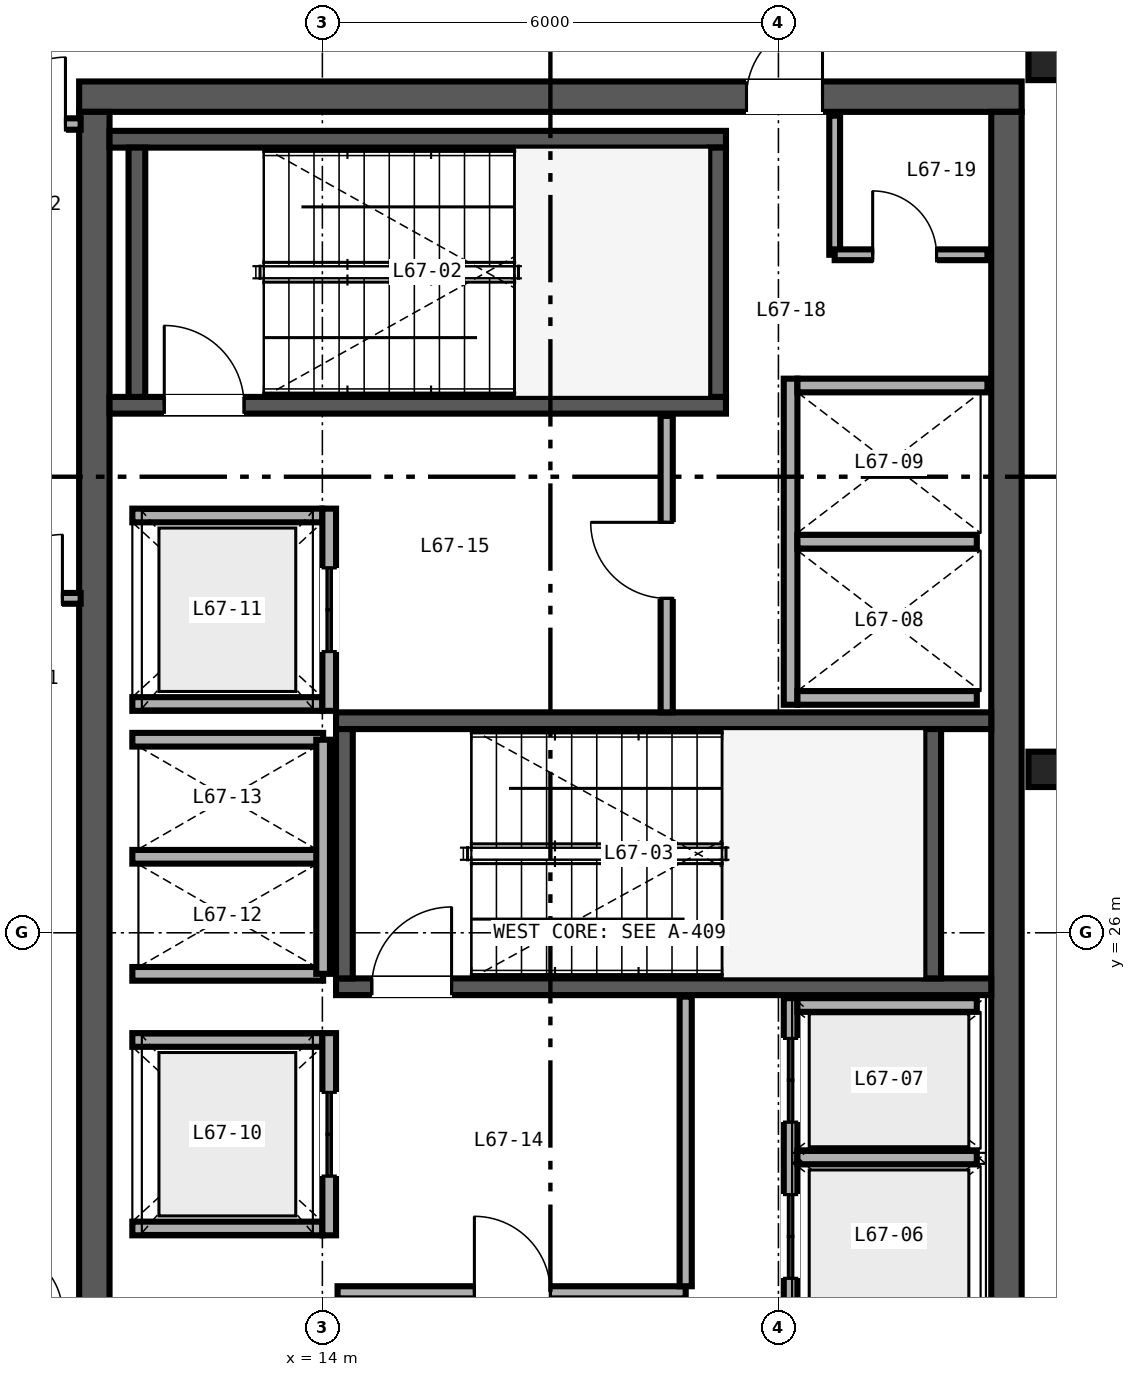
"""IFC4 building model, lengths in metres.
Left out: names, types, materials, properties, quantities, classifications, styles, units other than length and angle.
Written with IfcOpenShell. Run it as: python <this file> out.ifc"""

import sys

from ifc_helpers import new_model, si_unit, direction, frame, frame_2d, origin, origin_2d, place, context, subcontext, project, spatial, rectangle, i_section, extrude, source, transform, mapped, element, fill, save


model = new_model("IFC4")
c1 = context("Model", 3, precision=1e-05, world=origin(), true_north=direction((0.0, 1.0)))
c2 = subcontext(c1, "Body", "Model", "MODEL_VIEW")
j1 = project(units=[si_unit("LENGTHUNIT", "METRE"), si_unit("PLANEANGLEUNIT", "RADIAN")], contexts=[c1])
p1 = place(None, origin())
s1 = spatial("IfcSite", under=j1, at=p1, CompositionType="ELEMENT")
p2 = place(p1, origin())
s2 = spatial("IfcBuilding", under=s1, at=p2, CompositionType="ELEMENT")
p3 = place(p2, frame((0.0, 0.0, 265.2)))
s3 = spatial("IfcBuildingStorey", under=s2, at=p3, CompositionType="ELEMENT", Elevation=265.2)
p4 = place(p3, frame((10.8, 37.0, 0.0), z_axis=(0.0, 0.0, 1.0), x_axis=(1.0, 0.0, 0.0)))
e1 = element("IfcWall", 1, at=p4, inside=s3, PredefinedType="SHEAR", context=c2, shape_type="SweptSolid", body=[
    extrude(rectangle(XDim=12.4, YDim=0.4, at=frame_2d((6.2, 0.0))), origin(), (0.0, 0.0, 1.0), 3.38),
])
p5 = place(p4, frame((8.78, 0.0, 0.0)))
e2 = element("IfcOpeningElement", 2, at=p5, cuts=e1, PredefinedType="OPENING", context=c2, shape_type="SweptSolid", body=[
    extrude(rectangle(XDim=1.0, YDim=2.15, at=frame_2d((0.5, 1.075))), frame((0.0, 0.21, 0.0), z_axis=(0.0, -1.0, 0.0), x_axis=(1.0, 0.0, 0.0)), (0.0, 0.0, 1.0), 0.42),
])
for number, where, z_axis, x_axis in (
    (3, (11.0, 15.2, 0.0), (0.0, 0.0, 1.0), (0.0, 1.0, 0.0)),
    (4, (23.0, 15.2, 0.0), (0.0, 0.0, 1.0), (0.0, 1.0, 0.0)),
):
    element("IfcWall", number, at=place(p3, frame(where, z_axis=z_axis, x_axis=x_axis)), inside=s3, PredefinedType="SHEAR", context=c2, shape_type="SweptSolid", body=[
        extrude(rectangle(XDim=21.6, YDim=0.4, at=frame_2d((10.8, 0.0))), origin(), (0.0, 0.0, 1.0), 3.38),
    ])
p6 = place(p3, frame((11.2, 32.94, 0.0), z_axis=(0.0, 0.0, 1.0), x_axis=(1.0, 0.0, 0.0)))
e5 = element("IfcWall", 5, at=p6, inside=s3, PredefinedType="SHEAR", context=c2, shape_type="SweptSolid", body=[
    extrude(rectangle(XDim=8.11, YDim=0.22, at=frame_2d((4.055, 0.0))), origin(), (0.0, 0.0, 1.0), 3.4),
])
p7 = place(p6, frame((0.72, 0.0, 0.0)))
e6 = element("IfcOpeningElement", 6, at=p7, cuts=e5, PredefinedType="OPENING", context=c2, shape_type="SweptSolid", body=[
    extrude(rectangle(XDim=1.05, YDim=2.15, at=frame_2d((0.525, 1.075))), frame((0.0, 0.12, 0.0), z_axis=(0.0, -1.0, 0.0), x_axis=(1.0, 0.0, 0.0)), (0.0, 0.0, 1.0), 0.24),
])
p8 = place(p3, frame((11.2, 36.44, 0.0), z_axis=(0.0, 0.0, 1.0), x_axis=(1.0, 0.0, 0.0)))
e7 = element("IfcWall", 7, at=p8, inside=s3, PredefinedType="SHEAR", context=c2, shape_type="SweptSolid", body=[
    extrude(rectangle(XDim=8.11, YDim=0.22, at=frame_2d((4.055, 0.0))), origin(), (0.0, 0.0, 1.0), 3.4),
])
for number, where, z_axis, x_axis in (
    (8, (11.56, 33.05, 0.0), (0.0, 0.0, 1.0), (0.0, 1.0, 0.0)),
    (9, (19.2, 33.05, 0.0), (0.0, 0.0, 1.0), (0.0, 1.0, 0.0)),
):
    element("IfcWall", number, at=place(p3, frame(where, z_axis=z_axis, x_axis=x_axis)), inside=s3, PredefinedType="SHEAR", context=c2, shape_type="SweptSolid", body=[
        extrude(rectangle(XDim=3.28, YDim=0.22, at=frame_2d((1.64, 0.0))), origin(), (0.0, 0.0, 1.0), 3.4),
    ])
p9 = place(p3, frame((14.18, 25.29, 0.0), z_axis=(0.0, 0.0, 1.0), x_axis=(1.0, 0.0, 0.0)))
e10 = element("IfcWall", 10, at=p9, inside=s3, PredefinedType="SHEAR", context=c2, shape_type="SweptSolid", body=[
    extrude(rectangle(XDim=8.62, YDim=0.22, at=frame_2d((4.31, 0.0))), origin(), (0.0, 0.0, 1.0), 3.4),
])
p10 = place(p9, frame((0.47, 0.0, 0.0)))
e11 = element("IfcOpeningElement", 11, at=p10, cuts=e10, PredefinedType="OPENING", context=c2, shape_type="SweptSolid", body=[
    extrude(rectangle(XDim=1.05, YDim=2.15, at=frame_2d((0.525, 1.075))), frame((0.0, 0.12, 0.0), z_axis=(0.0, -1.0, 0.0), x_axis=(1.0, 0.0, 0.0)), (0.0, 0.0, 1.0), 0.24),
])
p11 = place(p3, frame((14.18, 28.79, 0.0), z_axis=(0.0, 0.0, 1.0), x_axis=(1.0, 0.0, 0.0)))
e12 = element("IfcWall", 12, at=p11, inside=s3, PredefinedType="SHEAR", context=c2, shape_type="SweptSolid", body=[
    extrude(rectangle(XDim=8.62, YDim=0.22, at=frame_2d((4.31, 0.0))), origin(), (0.0, 0.0, 1.0), 3.4),
])
for number, where, z_axis, x_axis in (
    (13, (14.29, 25.4, 0.0), (0.0, 0.0, 1.0), (0.0, 1.0, 0.0)),
    (14, (22.03, 25.4, 0.0), (0.0, 0.0, 1.0), (0.0, 1.0, 0.0)),
):
    element("IfcWall", number, at=place(p3, frame(where, z_axis=z_axis, x_axis=x_axis)), inside=s3, PredefinedType="SHEAR", context=c2, shape_type="SweptSolid", body=[
        extrude(rectangle(XDim=3.28, YDim=0.22, at=frame_2d((1.64, 0.0))), origin(), (0.0, 0.0, 1.0), 3.4),
    ])
m1 = source(origin(), c2, "Body", "SweptSolid", [
    extrude(i_section(OverallWidth=0.422, OverallDepth=0.465, WebThickness=0.045, FlangeThickness=0.073, FilletRadius=0.025, at=origin_2d()), origin(), (0.0, 0.0, 1.0), 3.38),
])
for number, where, z_axis, x_axis in (
    (15, (23.5, 28.15, 0.0), (0.0, 0.0, 1.0), (1.0, 0.0, 0.0)),
    (16, (23.5, 37.45, 0.0), (0.0, 0.0, 1.0), (1.0, 0.0, 0.0)),
):
    element("IfcColumn", number, at=place(p3, frame(where, z_axis=z_axis, x_axis=x_axis)), inside=s3, PredefinedType="COLUMN", context=c2, shape_type="MappedRepresentation", body=[
        mapped(m1, transform((0.0, 0.0, 0.0), scale=1.0)),
    ])
p12 = place(p3, frame((20.16, 18.82, 0.0), z_axis=(0.0, 0.0, 1.0), x_axis=(0.0, 1.0, 0.0)))
e17 = element("IfcWall", 17, at=p12, inside=s3, PredefinedType="SOLIDWALL", context=c2, shape_type="SweptSolid", body=[
    extrude(rectangle(XDim=6.32, YDim=0.18, at=frame_2d((3.16, 0.0))), origin(), (0.0, 0.0, 1.0), 2.48),
])
p13 = place(p12, frame((0.555, 0.0, 0.0)))
e18 = element("IfcOpeningElement", 18, at=p13, cuts=e17, PredefinedType="OPENING", context=c2, shape_type="SweptSolid", body=[
    extrude(rectangle(XDim=1.1, YDim=2.2, at=frame_2d((0.55, 1.1))), frame((0.0, 0.1, 0.0), z_axis=(0.0, -1.0, 0.0), x_axis=(1.0, 0.0, 0.0)), (0.0, 0.0, 1.0), 0.2),
])
p14 = place(p12, frame((2.635, 0.0, 0.0)))
e19 = element("IfcOpeningElement", 19, at=p14, cuts=e17, PredefinedType="OPENING", context=c2, shape_type="SweptSolid", body=[
    extrude(rectangle(XDim=1.1, YDim=2.2, at=frame_2d((0.55, 1.1))), frame((0.0, 0.1, 0.0), z_axis=(0.0, -1.0, 0.0), x_axis=(1.0, 0.0, 0.0)), (0.0, 0.0, 1.0), 0.2),
])
p15 = place(p12, frame((4.69, 0.0, 0.0)))
e20 = element("IfcOpeningElement", 20, at=p15, cuts=e17, PredefinedType="OPENING", context=c2, shape_type="SweptSolid", body=[
    extrude(rectangle(XDim=1.1, YDim=2.2, at=frame_2d((0.55, 1.1))), frame((0.0, 0.1, 0.0), z_axis=(0.0, -1.0, 0.0), x_axis=(1.0, 0.0, 0.0)), (0.0, 0.0, 1.0), 0.2),
])
for number, where, z_axis, x_axis in (
    (21, (20.25, 25.05, 0.0), (0.0, 0.0, 1.0), (1.0, 0.0, 0.0)),
    (22, (20.25, 23.045, 0.0), (0.0, 0.0, 1.0), (1.0, 0.0, 0.0)),
):
    element("IfcWall", number, at=place(p3, frame(where, z_axis=z_axis, x_axis=x_axis)), inside=s3, PredefinedType="SOLIDWALL", context=c2, shape_type="SweptSolid", body=[
        extrude(rectangle(XDim=2.36, YDim=0.18, at=frame_2d((1.18, 0.0))), origin(), (0.0, 0.0, 1.0), 3.38),
    ])
p16 = place(p3, frame((20.16, 29.0, 0.0), z_axis=(0.0, 0.0, 1.0), x_axis=(0.0, 1.0, 0.0)))
e23 = element("IfcWall", 23, at=p16, inside=s3, PredefinedType="SOLIDWALL", context=c2, shape_type="SweptSolid", body=[
    extrude(rectangle(XDim=4.29, YDim=0.18, at=frame_2d((2.145, 0.0))), origin(), (0.0, 0.0, 1.0), 3.38),
])
p17 = place(p3, frame((20.25, 29.09, 0.0), z_axis=(0.0, 0.0, 1.0), x_axis=(1.0, 0.0, 0.0)))
e24 = element("IfcWall", 24, at=p17, inside=s3, PredefinedType="SOLIDWALL", context=c2, shape_type="SweptSolid", body=[
    extrude(rectangle(XDim=2.36, YDim=0.18, at=frame_2d((1.18, 0.0))), origin(), (0.0, 0.0, 1.0), 3.38),
])
p18 = place(p3, frame((20.25, 33.2, 0.0), z_axis=(0.0, 0.0, 1.0), x_axis=(1.0, 0.0, 0.0)))
e25 = element("IfcWall", 25, at=p18, inside=s3, PredefinedType="SOLIDWALL", context=c2, shape_type="SweptSolid", body=[
    extrude(rectangle(XDim=2.5, YDim=0.18, at=frame_2d((1.25, 0.0))), origin(), (0.0, 0.0, 1.0), 3.38),
])
p19 = place(p3, frame((20.25, 31.145, 0.0), z_axis=(0.0, 0.0, 1.0), x_axis=(1.0, 0.0, 0.0)))
e26 = element("IfcWall", 26, at=p19, inside=s3, PredefinedType="SOLIDWALL", context=c2, shape_type="SweptSolid", body=[
    extrude(rectangle(XDim=2.36, YDim=0.18, at=frame_2d((1.18, 0.0))), origin(), (0.0, 0.0, 1.0), 3.38),
])
for number, where, z_axis, x_axis in (
    (27, (11.5, 22.11, 0.0), (0.0, 0.0, 1.0), (1.0, 0.0, 0.0)),
    (28, (11.5, 24.59, 0.0), (0.0, 0.0, 1.0), (1.0, 0.0, 0.0)),
):
    element("IfcWall", number, at=place(p3, frame(where, z_axis=z_axis, x_axis=x_axis)), inside=s3, PredefinedType="SOLIDWALL", context=c2, shape_type="SweptSolid", body=[
        extrude(rectangle(XDim=2.5, YDim=0.18, at=frame_2d((1.25, 0.0))), origin(), (0.0, 0.0, 1.0), 3.38),
    ])
p20 = place(p3, frame((14.09, 22.02, 0.0), z_axis=(0.0, 0.0, 1.0), x_axis=(0.0, 1.0, 0.0)))
e29 = element("IfcWall", 29, at=p20, inside=s3, PredefinedType="SOLIDWALL", context=c2, shape_type="SweptSolid", body=[
    extrude(rectangle(XDim=2.66, YDim=0.18, at=frame_2d((1.33, 0.0))), origin(), (0.0, 0.0, 1.0), 3.38),
])
p21 = place(p20, frame((0.78, 0.0, 0.0)))
e30 = element("IfcOpeningElement", 30, at=p21, cuts=e29, PredefinedType="OPENING", context=c2, shape_type="SweptSolid", body=[
    extrude(rectangle(XDim=1.1, YDim=2.2, at=frame_2d((0.55, 1.1))), frame((0.0, 0.1, 0.0), z_axis=(0.0, -1.0, 0.0), x_axis=(1.0, 0.0, 0.0)), (0.0, 0.0, 1.0), 0.2),
])
for number, where, z_axis, x_axis in (
    (31, (11.5, 29.01, 0.0), (0.0, 0.0, 1.0), (1.0, 0.0, 0.0)),
    (32, (11.5, 31.49, 0.0), (0.0, 0.0, 1.0), (1.0, 0.0, 0.0)),
):
    element("IfcWall", number, at=place(p3, frame(where, z_axis=z_axis, x_axis=x_axis)), inside=s3, PredefinedType="SOLIDWALL", context=c2, shape_type="SweptSolid", body=[
        extrude(rectangle(XDim=2.5, YDim=0.18, at=frame_2d((1.25, 0.0))), origin(), (0.0, 0.0, 1.0), 3.38),
    ])
p22 = place(p3, frame((14.09, 28.92, 0.0), z_axis=(0.0, 0.0, 1.0), x_axis=(0.0, 1.0, 0.0)))
e33 = element("IfcWall", 33, at=p22, inside=s3, PredefinedType="SOLIDWALL", context=c2, shape_type="SweptSolid", body=[
    extrude(rectangle(XDim=2.66, YDim=0.18, at=frame_2d((1.33, 0.0))), origin(), (0.0, 0.0, 1.0), 3.38),
])
p23 = place(p22, frame((0.78, 0.0, 0.0)))
e34 = element("IfcOpeningElement", 34, at=p23, cuts=e33, PredefinedType="OPENING", context=c2, shape_type="SweptSolid", body=[
    extrude(rectangle(XDim=1.1, YDim=2.2, at=frame_2d((0.55, 1.1))), frame((0.0, 0.1, 0.0), z_axis=(0.0, -1.0, 0.0), x_axis=(1.0, 0.0, 0.0)), (0.0, 0.0, 1.0), 0.2),
])
for number, where, z_axis, x_axis in (
    (35, (11.5, 25.46, 0.0), (0.0, 0.0, 1.0), (1.0, 0.0, 0.0)),
    (36, (11.5, 27.0, 0.0), (0.0, 0.0, 1.0), (1.0, 0.0, 0.0)),
    (37, (11.5, 28.54, 0.0), (0.0, 0.0, 1.0), (1.0, 0.0, 0.0)),
):
    element("IfcWall", number, at=place(p3, frame(where, z_axis=z_axis, x_axis=x_axis)), inside=s3, PredefinedType="SOLIDWALL", context=c2, shape_type="SweptSolid", body=[
        extrude(rectangle(XDim=2.51, YDim=0.18, at=frame_2d((1.255, 0.0))), origin(), (0.0, 0.0, 1.0), 3.38),
    ])
p24 = place(p3, frame((14.01, 25.46, 0.0), z_axis=(0.0, 0.0, 1.0), x_axis=(0.0, 1.0, 0.0)))
e38 = element("IfcWall", 38, at=p24, inside=s3, PredefinedType="SOLIDWALL", context=c2, shape_type="SweptSolid", body=[
    extrude(rectangle(XDim=3.08, YDim=0.18, at=frame_2d((1.54, 0.0))), origin(), (0.0, 0.0, 1.0), 3.38),
])
p25 = place(p3, frame((14.2, 21.27, 0.0), z_axis=(0.0, 0.0, 1.0), x_axis=(1.0, 0.0, 0.0)))
e39 = element("IfcWall", 39, at=p25, inside=s3, PredefinedType="PARTITIONING", context=c2, shape_type="SweptSolid", body=[
    extrude(rectangle(XDim=4.58, YDim=0.16, at=frame_2d((2.29, 0.0))), origin(), (0.0, 0.0, 1.0), 3.38),
])
p26 = place(p25, frame((1.8, 0.0, 0.0)))
e40 = element("IfcOpeningElement", 40, at=p26, cuts=e39, PredefinedType="OPENING", context=c2, shape_type="SweptSolid", body=[
    extrude(rectangle(XDim=1.0, YDim=2.15, at=frame_2d((0.5, 1.075))), frame((0.0, 0.09, 0.0), z_axis=(0.0, -1.0, 0.0), x_axis=(1.0, 0.0, 0.0)), (0.0, 0.0, 1.0), 0.18),
])
p27 = place(p3, frame((18.78, 21.35, 0.0), z_axis=(0.0, 0.0, 1.0), x_axis=(0.0, 1.0, 0.0)))
e41 = element("IfcWall", 41, at=p27, inside=s3, PredefinedType="PARTITIONING", context=c2, shape_type="SweptSolid", body=[
    extrude(rectangle(XDim=3.81, YDim=0.16, at=frame_2d((1.905, 0.0))), origin(), (0.0, 0.0, 1.0), 3.38),
])
p28 = place(p3, frame((18.53, 28.9, 0.0), z_axis=(0.0, 0.0, 1.0), x_axis=(0.0, 1.0, 0.0)))
e42 = element("IfcWall", 42, at=p28, inside=s3, PredefinedType="PARTITIONING", context=c2, shape_type="SweptSolid", body=[
    extrude(rectangle(XDim=3.9, YDim=0.16, at=frame_2d((1.95, 0.0))), origin(), (0.0, 0.0, 1.0), 3.38),
])
p29 = place(p28, frame((1.5, 0.0, 0.0)))
e43 = element("IfcOpeningElement", 43, at=p29, cuts=e42, PredefinedType="OPENING", context=c2, shape_type="SweptSolid", body=[
    extrude(rectangle(XDim=1.0, YDim=2.15, at=frame_2d((0.5, 1.075))), frame((0.0, 0.09, 0.0), z_axis=(0.0, -1.0, 0.0), x_axis=(1.0, 0.0, 0.0)), (0.0, 0.0, 1.0), 0.18),
])
p30 = place(p3, frame((20.74, 34.92, 0.0), z_axis=(0.0, 0.0, 1.0), x_axis=(0.0, 1.0, 0.0)))
e44 = element("IfcWall", 44, at=p30, inside=s3, PredefinedType="PARTITIONING", context=c2, shape_type="SweptSolid", body=[
    extrude(rectangle(XDim=1.83, YDim=0.142, at=frame_2d((0.915, 0.0))), origin(), (0.0, 0.0, 1.0), 3.38),
])
p31 = place(p3, frame((20.74, 34.92, 0.0), z_axis=(0.0, 0.0, 1.0), x_axis=(1.0, 0.0, 0.0)))
e45 = element("IfcWall", 45, at=p31, inside=s3, PredefinedType="PARTITIONING", context=c2, shape_type="SweptSolid", body=[
    extrude(rectangle(XDim=2.01, YDim=0.142, at=frame_2d((1.005, 0.0))), origin(), (0.0, 0.0, 1.0), 3.38),
])
p32 = place(p31, frame((0.5, 0.0, 0.0)))
e46 = element("IfcOpeningElement", 46, at=p32, cuts=e45, PredefinedType="OPENING", context=c2, shape_type="SweptSolid", body=[
    extrude(rectangle(XDim=0.84, YDim=2.1, at=frame_2d((0.42, 1.05))), frame((0.0, 0.081, 0.0), z_axis=(0.0, -1.0, 0.0), x_axis=(1.0, 0.0, 0.0)), (0.0, 0.0, 1.0), 0.162),
])
p33 = place(p3, frame((8.16, 36.64, 0.0), z_axis=(0.0, 0.0, 1.0), x_axis=(1.0, 0.0, 0.0)))
e47 = element("IfcWall", 47, at=p33, inside=s3, PredefinedType="PARTITIONING", context=c2, shape_type="SweptSolid", body=[
    extrude(rectangle(XDim=2.66, YDim=0.15, at=frame_2d((1.33, 0.0))), origin(), (0.0, 0.0, 1.0), 2.763),
])
p34 = place(p33, frame((1.58, 0.0, 0.0)))
e48 = element("IfcOpeningElement", 48, at=p34, cuts=e47, PredefinedType="OPENING", context=c2, shape_type="SweptSolid", body=[
    extrude(rectangle(XDim=0.88, YDim=2.15, at=frame_2d((0.44, 1.075))), frame((0.0, 0.085, 0.0), z_axis=(0.0, -1.0, 0.0), x_axis=(1.0, 0.0, 0.0)), (0.0, 0.0, 1.0), 0.17),
])
p35 = place(p3, frame((8.16, 30.4, 0.0), z_axis=(0.0, 0.0, 1.0), x_axis=(1.0, 0.0, 0.0)))
e49 = element("IfcWall", 49, at=p35, inside=s3, PredefinedType="PARTITIONING", context=c2, shape_type="SweptSolid", body=[
    extrude(rectangle(XDim=2.66, YDim=0.142, at=frame_2d((1.33, 0.0))), origin(), (0.0, 0.0, 1.0), 2.763),
])
p36 = place(p35, frame((1.58, 0.0, 0.0)))
e50 = element("IfcOpeningElement", 50, at=p36, cuts=e49, PredefinedType="OPENING", context=c2, shape_type="SweptSolid", body=[
    extrude(rectangle(XDim=0.84, YDim=2.1, at=frame_2d((0.42, 1.05))), frame((0.0, 0.081, 0.0), z_axis=(0.0, -1.0, 0.0), x_axis=(1.0, 0.0, 0.0)), (0.0, 0.0, 1.0), 0.162),
])
m2 = source(origin(), c2, "Body", "SweptSolid", [
    extrude(rectangle(XDim=1.05, YDim=2.15, at=frame_2d((0.525, 1.075))), frame((0.0, 0.025, 0.0), z_axis=(0.0, -1.0, 0.0), x_axis=(1.0, 0.0, 0.0)), (0.0, 0.0, 1.0), 0.05),
])
p37 = place(p7, origin())
e51 = element("IfcDoor", 51, at=p37, inside=s3, OperationType="SINGLE_SWING_LEFT", PredefinedType="DOOR", context=c2, shape_type="MappedRepresentation", body=[
    mapped(m2, transform((0.0, 0.0, 0.0), scale=1.0)),
])
fill(e6, e51)
p38 = place(p10, origin())
e52 = element("IfcDoor", 52, at=p38, inside=s3, OperationType="SINGLE_SWING_RIGHT", PredefinedType="DOOR", context=c2, shape_type="MappedRepresentation", body=[
    mapped(m2, transform((0.0, 0.0, 0.0), scale=1.0)),
])
fill(e11, e52)
m3 = source(origin(), c2, "Body", "SweptSolid", [
    extrude(rectangle(XDim=1.1, YDim=2.2, at=frame_2d((0.55, 1.1))), frame((0.0, 0.025, 0.0), z_axis=(0.0, -1.0, 0.0), x_axis=(1.0, 0.0, 0.0)), (0.0, 0.0, 1.0), 0.05),
])
p39 = place(p14, origin())
e53 = element("IfcDoor", 53, at=p39, inside=s3, OperationType="DOUBLE_DOOR_SLIDING", PredefinedType="DOOR", context=c2, shape_type="MappedRepresentation", body=[
    mapped(m3, transform((0.0, 0.0, 0.0), scale=1.0)),
])
fill(e19, e53)
p40 = place(p15, origin())
e54 = element("IfcDoor", 54, at=p40, inside=s3, OperationType="DOUBLE_DOOR_SLIDING", PredefinedType="DOOR", context=c2, shape_type="MappedRepresentation", body=[
    mapped(m3, transform((0.0, 0.0, 0.0), scale=1.0)),
])
fill(e20, e54)
p41 = place(p21, origin())
e55 = element("IfcDoor", 55, at=p41, inside=s3, OperationType="DOUBLE_DOOR_SLIDING", PredefinedType="DOOR", context=c2, shape_type="MappedRepresentation", body=[
    mapped(m3, transform((0.0, 0.0, 0.0), scale=1.0)),
])
fill(e30, e55)
p42 = place(p23, origin())
e56 = element("IfcDoor", 56, at=p42, inside=s3, OperationType="DOUBLE_DOOR_SLIDING", PredefinedType="DOOR", context=c2, shape_type="MappedRepresentation", body=[
    mapped(m3, transform((0.0, 0.0, 0.0), scale=1.0)),
])
fill(e34, e56)
m4 = source(origin(), c2, "Body", "SweptSolid", [
    extrude(rectangle(XDim=1.0, YDim=2.15, at=frame_2d((0.5, 1.075))), frame((0.0, 0.025, 0.0), z_axis=(0.0, -1.0, 0.0), x_axis=(1.0, 0.0, 0.0)), (0.0, 0.0, 1.0), 0.05),
])
p43 = place(p26, origin())
e57 = element("IfcDoor", 57, at=p43, inside=s3, OperationType="SINGLE_SWING_LEFT", PredefinedType="DOOR", context=c2, shape_type="MappedRepresentation", body=[
    mapped(m4, transform((0.0, 0.0, 0.0), scale=1.0)),
])
fill(e40, e57)
p44 = place(p29, origin())
e58 = element("IfcDoor", 58, at=p44, inside=s3, OperationType="SINGLE_SWING_RIGHT", PredefinedType="DOOR", context=c2, shape_type="MappedRepresentation", body=[
    mapped(m4, transform((0.0, 0.0, 0.0), scale=1.0)),
])
fill(e43, e58)
m5 = source(origin(), c2, "Body", "SweptSolid", [
    extrude(rectangle(XDim=0.84, YDim=2.1, at=frame_2d((0.42, 1.05))), frame((0.0, 0.025, 0.0), z_axis=(0.0, -1.0, 0.0), x_axis=(1.0, 0.0, 0.0)), (0.0, 0.0, 1.0), 0.05),
])
p45 = place(p32, origin())
e59 = element("IfcDoor", 59, at=p45, inside=s3, OperationType="SINGLE_SWING_LEFT", PredefinedType="DOOR", context=c2, shape_type="MappedRepresentation", body=[
    mapped(m5, transform((0.0, 0.0, 0.0), scale=1.0)),
])
fill(e46, e59)
p46 = place(p5, origin())
e60 = element("IfcDoor", 60, at=p46, inside=s3, OperationType="SINGLE_SWING_RIGHT", PredefinedType="DOOR", context=c2, shape_type="MappedRepresentation", body=[
    mapped(m4, transform((0.0, 0.0, 0.0), scale=1.0)),
])
fill(e2, e60)
m6 = source(origin(), c2, "Body", "SweptSolid", [
    extrude(rectangle(XDim=0.88, YDim=2.15, at=frame_2d((0.44, 1.075))), frame((0.0, 0.025, 0.0), z_axis=(0.0, -1.0, 0.0), x_axis=(1.0, 0.0, 0.0)), (0.0, 0.0, 1.0), 0.05),
])
p47 = place(p34, origin())
e61 = element("IfcDoor", 61, at=p47, inside=s3, OperationType="SINGLE_SWING_RIGHT", PredefinedType="DOOR", context=c2, shape_type="MappedRepresentation", body=[
    mapped(m6, transform((0.0, 0.0, 0.0), scale=1.0)),
])
fill(e48, e61)
p48 = place(p36, origin())
e62 = element("IfcDoor", 62, at=p48, inside=s3, OperationType="SINGLE_SWING_RIGHT", PredefinedType="DOOR", context=c2, shape_type="MappedRepresentation", body=[
    mapped(m5, transform((0.0, 0.0, 0.0), scale=1.0)),
])
fill(e50, e62)
save(model, sys.argv[1])
